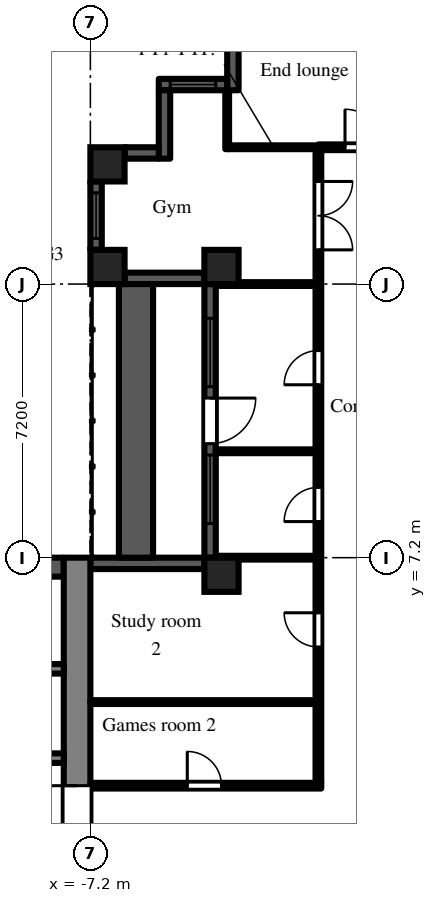
"""IFC4 building model, lengths in metres.
Left out: names, types, materials, properties, quantities, classifications, styles, units other than length and angle.
Written with IfcOpenShell. Run it as: python <this file> out.ifc"""

import sys

from ifc_helpers import new_model, si_unit, direction, frame, frame_2d, origin, origin_2d, place, context, subcontext, project, spatial, rectangle, extrude, element, fill, save


model = new_model("IFC4")
c1 = context("Model", 3, precision=1e-05, world=origin(), true_north=direction((0.0, 1.0)))
c2 = subcontext(c1, "Body", "Model", "MODEL_VIEW")
j1 = project(units=[si_unit("LENGTHUNIT", "METRE"), si_unit("PLANEANGLEUNIT", "RADIAN")], contexts=[c1])
p1 = place(None, origin())
s1 = spatial("IfcSite", under=j1, at=p1, CompositionType="ELEMENT")
p2 = place(p1, origin())
s2 = spatial("IfcBuilding", under=s1, at=p2, CompositionType="ELEMENT")
p3 = place(p2, frame((0.0, 0.0, 102.9)))
s3 = spatial("IfcBuildingStorey", under=s2, at=p3, CompositionType="ELEMENT", Elevation=102.9)
for number, where, z_axis, x_axis in (
    (1, (-6.75, 14.85, 0.0), (0.0, 0.0, 1.0), (1.0, 0.0, 0.0)),
    (2, (-6.75, 17.55, 0.0), (0.0, 0.0, 1.0), (1.0, 0.0, 0.0)),
    (3, (-3.75, 6.75, 0.0), (0.0, 0.0, 1.0), (1.0, 0.0, 0.0)),
    (4, (-3.75, 14.85, 0.0), (0.0, 0.0, 1.0), (1.0, 0.0, 0.0)),
):
    element("IfcColumn", number, at=place(p3, frame(where, z_axis=z_axis, x_axis=x_axis)), inside=s3, PredefinedType="COLUMN", context=c2, shape_type="SweptSolid", body=[
        extrude(rectangle(XDim=0.9, YDim=0.9, at=origin_2d()), origin(), (0.0, 0.0, 1.0), 3.0),
    ])
p4 = place(p3, frame((-3.45, 20.7, 0.0), z_axis=(0.0, 0.0, 1.0), x_axis=(0.0, -1.0, 0.0)))
e5 = element("IfcWall", 5, at=p4, inside=s3, PredefinedType="SOLIDWALL", context=c2, shape_type="SweptSolid", body=[
    extrude(rectangle(XDim=1.2, YDim=0.3, at=frame_2d((0.6, 0.0))), origin(), (0.0, 0.0, 1.0), 2.575),
])
p5 = place(p3, frame((-3.6, 19.65, 0.0), z_axis=(0.0, 0.0, 1.0), x_axis=(-1.0, 0.0, 0.0)))
e6 = element("IfcWall", 6, at=p5, inside=s3, PredefinedType="SOLIDWALL", context=c2, shape_type="SweptSolid", body=[
    extrude(rectangle(XDim=1.8, YDim=0.3, at=frame_2d((0.9, 0.0))), origin(), (0.0, 0.0, 1.0), 2.575),
])
p6 = place(p5, frame((0.3, 0.0, 0.2)))
e7 = element("IfcOpeningElement", 7, at=p6, cuts=e6, PredefinedType="OPENING", context=c2, shape_type="SweptSolid", body=[
    extrude(rectangle(XDim=1.2, YDim=1.85, at=frame_2d((0.6, 0.925))), frame((0.0, 0.16, 0.0), z_axis=(0.0, -1.0, 0.0), x_axis=(1.0, 0.0, 0.0)), (0.0, 0.0, 1.0), 0.32),
])
p7 = place(p3, frame((-5.25, 19.5, 0.0), z_axis=(0.0, 0.0, 1.0), x_axis=(0.0, -1.0, 0.0)))
e8 = element("IfcWall", 8, at=p7, inside=s3, PredefinedType="SOLIDWALL", context=c2, shape_type="SweptSolid", body=[
    extrude(rectangle(XDim=1.8, YDim=0.3, at=frame_2d((0.9, 0.0))), origin(), (0.0, 0.0, 1.0), 2.575),
])
p8 = place(p3, frame((-5.4, 17.85, 0.0), z_axis=(0.0, 0.0, 1.0), x_axis=(-1.0, 0.0, 0.0)))
e9 = element("IfcWall", 9, at=p8, inside=s3, PredefinedType="SOLIDWALL", context=c2, shape_type="SweptSolid", body=[
    extrude(rectangle(XDim=0.9, YDim=0.3, at=frame_2d((0.45, 0.0))), origin(), (0.0, 0.0, 1.0), 2.575),
])
p9 = place(p3, frame((-7.05, 17.1, 0.0), z_axis=(0.0, 0.0, 1.0), x_axis=(0.0, -1.0, 0.0)))
e10 = element("IfcWall", 10, at=p9, inside=s3, PredefinedType="SOLIDWALL", context=c2, shape_type="SweptSolid", body=[
    extrude(rectangle(XDim=1.8, YDim=0.3, at=frame_2d((0.9, 0.0))), origin(), (0.0, 0.0, 1.0), 2.1),
])
p10 = place(p9, frame((0.3, 0.0, 0.2)))
e11 = element("IfcOpeningElement", 11, at=p10, cuts=e10, PredefinedType="OPENING", context=c2, shape_type="SweptSolid", body=[
    extrude(rectangle(XDim=1.2, YDim=1.85, at=frame_2d((0.6, 0.925))), frame((0.0, 0.16, 0.0), z_axis=(0.0, -1.0, 0.0), x_axis=(1.0, 0.0, 0.0)), (0.0, 0.0, 1.0), 0.32),
])
p11 = place(p3, frame((-6.3, 14.55, 0.0), z_axis=(0.0, 0.0, 1.0), x_axis=(1.0, 0.0, 0.0)))
e12 = element("IfcWall", 12, at=p11, inside=s3, PredefinedType="SOLIDWALL", context=c2, shape_type="SweptSolid", body=[
    extrude(rectangle(XDim=2.1, YDim=0.3, at=frame_2d((1.05, 0.0))), origin(), (0.0, 0.0, 1.0), 2.1),
])
p12 = place(p3, frame((-4.05, 14.4, 0.0), z_axis=(0.0, 0.0, 1.0), x_axis=(0.0, -1.0, 0.0)))
e13 = element("IfcWall", 13, at=p12, inside=s3, PredefinedType="SOLIDWALL", context=c2, shape_type="SweptSolid", body=[
    extrude(rectangle(XDim=7.2, YDim=0.3, at=frame_2d((3.6, 0.0))), origin(), (0.0, 0.0, 1.0), 2.1),
])
p13 = place(p12, frame((3.0, 0.0, 0.0)))
e14 = element("IfcOpeningElement", 14, at=p13, cuts=e13, PredefinedType="OPENING", context=c2, shape_type="SweptSolid", body=[
    extrude(rectangle(XDim=1.2, YDim=2.05, at=frame_2d((0.6, 1.025))), frame((0.0, 0.16, 0.0), z_axis=(0.0, -1.0, 0.0), x_axis=(1.0, 0.0, 0.0)), (0.0, 0.0, 1.0), 0.32),
])
p14 = place(p12, frame((0.9, 0.0, 0.2)))
e15 = element("IfcOpeningElement", 15, at=p14, cuts=e13, PredefinedType="OPENING", context=c2, shape_type="SweptSolid", body=[
    extrude(rectangle(XDim=1.8, YDim=1.85, at=frame_2d((0.9, 0.925))), frame((0.0, 0.16, 0.0), z_axis=(0.0, -1.0, 0.0), x_axis=(1.0, 0.0, 0.0)), (0.0, 0.0, 1.0), 0.32),
])
p15 = place(p12, frame((4.5, 0.0, 0.2)))
e16 = element("IfcOpeningElement", 16, at=p15, cuts=e13, PredefinedType="OPENING", context=c2, shape_type="SweptSolid", body=[
    extrude(rectangle(XDim=1.8, YDim=1.85, at=frame_2d((0.9, 0.925))), frame((0.0, 0.16, 0.0), z_axis=(0.0, -1.0, 0.0), x_axis=(1.0, 0.0, 0.0)), (0.0, 0.0, 1.0), 0.32),
])
p16 = place(p3, frame((-4.2, 7.05, 0.0), z_axis=(0.0, 0.0, 1.0), x_axis=(-1.0, 0.0, 0.0)))
e17 = element("IfcWall", 17, at=p16, inside=s3, PredefinedType="SOLIDWALL", context=c2, shape_type="SweptSolid", body=[
    extrude(rectangle(XDim=3.0, YDim=0.3, at=frame_2d((1.5, 0.0))), origin(), (0.0, 0.0, 1.0), 2.1),
])
p17 = place(p3, frame((-6.0, 7.2, 0.0), z_axis=(0.0, 0.0, 1.0), x_axis=(0.0, 1.0, 0.0)))
e18 = element("IfcWall", 18, at=p17, inside=s3, PredefinedType="PARAPET", context=c2, shape_type="SweptSolid", body=[
    extrude(rectangle(XDim=7.2, YDim=0.9, at=frame_2d((3.6, 0.0))), origin(), (0.0, 0.0, 1.0), 0.8),
])
p18 = place(p3, frame((-7.55, -7.2, 0.0), z_axis=(0.0, 0.0, 1.0), x_axis=(0.0, 1.0, 0.0)))
e19 = element("IfcWall", 19, at=p18, inside=s3, PredefinedType="SHEAR", context=c2, shape_type="SweptSolid", body=[
    extrude(rectangle(XDim=14.4, YDim=0.7, at=frame_2d((7.2, 0.0))), origin(), (0.0, 0.0, 1.0), 2.575),
])
p19 = place(p18, frame((6.0, 0.0, 0.0)))
e20 = element("IfcOpeningElement", 20, at=p19, cuts=e19, PredefinedType="OPENING", context=c2, shape_type="SweptSolid", body=[
    extrude(rectangle(XDim=2.4, YDim=2.2, at=frame_2d((1.2, 1.1))), frame((0.0, 0.36, 0.0), z_axis=(0.0, -1.0, 0.0), x_axis=(1.0, 0.0, 0.0)), (0.0, 0.0, 1.0), 0.72),
])
p20 = place(p3, frame((-7.9, 6.95, 0.0), z_axis=(0.0, 0.0, 1.0), x_axis=(-1.0, 0.0, 0.0)))
e21 = element("IfcWall", 21, at=p20, inside=s3, PredefinedType="SHEAR", context=c2, shape_type="SweptSolid", body=[
    extrude(rectangle(XDim=12.95, YDim=0.5, at=frame_2d((6.475, 0.0))), origin(), (0.0, 0.0, 1.0), 2.575),
])
p21 = place(p3, frame((-7.9, 1.925, 0.0), z_axis=(0.0, 0.0, 1.0), x_axis=(-1.0, 0.0, 0.0)))
e22 = element("IfcWall", 22, at=p21, inside=s3, PredefinedType="SHEAR", context=c2, shape_type="SweptSolid", body=[
    extrude(rectangle(XDim=12.95, YDim=0.25, at=frame_2d((6.475, 0.0))), origin(), (0.0, 0.0, 1.0), 2.575),
])
p22 = place(p21, frame((0.525, 0.0, 0.0)))
e23 = element("IfcOpeningElement", 23, at=p22, cuts=e22, PredefinedType="OPENING", context=c2, shape_type="SweptSolid", body=[
    extrude(rectangle(XDim=0.9, YDim=2.1, at=frame_2d((0.45, 1.05))), frame((0.0, 0.135, 0.0), z_axis=(0.0, -1.0, 0.0), x_axis=(1.0, 0.0, 0.0)), (0.0, 0.0, 1.0), 0.27),
])
p23 = place(p21, frame((2.625, 0.0, 0.0)))
e24 = element("IfcOpeningElement", 24, at=p23, cuts=e22, PredefinedType="OPENING", context=c2, shape_type="SweptSolid", body=[
    extrude(rectangle(XDim=1.1, YDim=2.1, at=frame_2d((0.55, 1.05))), frame((0.0, 0.135, 0.0), z_axis=(0.0, -1.0, 0.0), x_axis=(1.0, 0.0, 0.0)), (0.0, 0.0, 1.0), 0.27),
])
p24 = place(p21, frame((4.925, 0.0, 0.0)))
e25 = element("IfcOpeningElement", 25, at=p24, cuts=e22, PredefinedType="OPENING", context=c2, shape_type="SweptSolid", body=[
    extrude(rectangle(XDim=0.9, YDim=2.1, at=frame_2d((0.45, 1.05))), frame((0.0, 0.135, 0.0), z_axis=(0.0, -1.0, 0.0), x_axis=(1.0, 0.0, 0.0)), (0.0, 0.0, 1.0), 0.27),
])
p25 = place(p21, frame((8.225, 0.0, 0.0)))
e26 = element("IfcOpeningElement", 26, at=p25, cuts=e22, PredefinedType="OPENING", context=c2, shape_type="SweptSolid", body=[
    extrude(rectangle(XDim=0.9, YDim=2.1, at=frame_2d((0.45, 1.05))), frame((0.0, 0.135, 0.0), z_axis=(0.0, -1.0, 0.0), x_axis=(1.0, 0.0, 0.0)), (0.0, 0.0, 1.0), 0.27),
])
p26 = place(p3, frame((-7.9, 4.275, 0.0), z_axis=(0.0, 0.0, 1.0), x_axis=(-1.0, 0.0, 0.0)))
e27 = element("IfcWall", 27, at=p26, inside=s3, PredefinedType="SHEAR", context=c2, shape_type="SweptSolid", body=[
    extrude(rectangle(XDim=1.95, YDim=0.25, at=frame_2d((0.975, 0.0))), origin(), (0.0, 0.0, 1.0), 2.575),
])
p27 = place(p3, frame((-7.2, 1.2, 0.0), z_axis=(0.0, 0.0, 1.0), x_axis=(1.0, 0.0, 0.0)))
e28 = element("IfcWall", 28, at=p27, inside=s3, PredefinedType="PARTITIONING", context=c2, shape_type="SweptSolid", body=[
    extrude(rectangle(XDim=6.075, YDim=0.15, at=frame_2d((3.038, 0.0))), origin(), (0.0, 0.0, 1.0), 2.575),
])
p28 = place(p27, frame((2.55, 0.0, 0.0)))
e29 = element("IfcOpeningElement", 29, at=p28, cuts=e28, PredefinedType="OPENING", context=c2, shape_type="SweptSolid", body=[
    extrude(rectangle(XDim=0.9, YDim=2.1, at=frame_2d((0.45, 1.05))), frame((0.0, 0.085, 0.0), z_axis=(0.0, -1.0, 0.0), x_axis=(1.0, 0.0, 0.0)), (0.0, 0.0, 1.0), 0.17),
])
p29 = place(p3, frame((-7.2, 3.4, 0.0), z_axis=(0.0, 0.0, 1.0), x_axis=(1.0, 0.0, 0.0)))
e30 = element("IfcWall", 30, at=p29, inside=s3, PredefinedType="PARTITIONING", context=c2, shape_type="SweptSolid", body=[
    extrude(rectangle(XDim=5.925, YDim=0.1, at=frame_2d((2.962, 0.0))), origin(), (0.0, 0.0, 1.0), 2.575),
])
for number, where, z_axis, x_axis in (
    (31, (-3.9, 7.2, 0.0), (0.0, 0.0, 1.0), (1.0, 0.0, 0.0)),
    (32, (-3.9, 10.0, 0.0), (0.0, 0.0, 1.0), (1.0, 0.0, 0.0)),
    (33, (-3.9, 14.4, 0.0), (0.0, 0.0, 1.0), (1.0, 0.0, 0.0)),
):
    element("IfcWall", number, at=place(p3, frame(where, z_axis=z_axis, x_axis=x_axis)), inside=s3, PredefinedType="PARTITIONING", context=c2, shape_type="SweptSolid", body=[
        extrude(rectangle(XDim=2.625, YDim=0.1, at=frame_2d((1.312, 0.0))), origin(), (0.0, 0.0, 1.0), 2.575),
    ])
p30 = place(p3, frame((-3.6, 17.95, 0.0), z_axis=(0.0, 0.0, 1.0), x_axis=(0.0, 1.0, 0.0)))
e34 = element("IfcWall", 34, at=p30, inside=s3, PredefinedType="PARTITIONING", context=c2, shape_type="SweptSolid", body=[
    extrude(rectangle(XDim=1.55, YDim=0.1, at=frame_2d((0.775, 0.0))), origin(), (0.0, 0.0, 1.0), 2.575),
])
p31 = place(p3, frame((-3.55, 18.0, 0.0), z_axis=(0.0, 0.0, 1.0), x_axis=(1.0, 0.0, 0.0)))
e35 = element("IfcWall", 35, at=p31, inside=s3, PredefinedType="PARTITIONING", context=c2, shape_type="SweptSolid", body=[
    extrude(rectangle(XDim=2.35, YDim=0.1, at=frame_2d((1.175, 0.0))), origin(), (0.0, 0.0, 1.0), 2.575),
])
p32 = place(p3, frame((-1.2, 1.275, 0.0), z_axis=(0.0, 0.0, 1.0), x_axis=(0.0, 1.0, 0.0)))
e36 = element("IfcWall", 36, at=p32, inside=s3, PredefinedType="PARTITIONING", context=c2, shape_type="SweptSolid", body=[
    extrude(rectangle(XDim=16.65, YDim=0.15, at=frame_2d((8.325, 0.0))), origin(), (0.0, 0.0, 1.0), 2.575),
])
p33 = place(p32, frame((3.575, 0.0, 0.0)))
e37 = element("IfcOpeningElement", 37, at=p33, cuts=e36, PredefinedType="OPENING", context=c2, shape_type="SweptSolid", body=[
    extrude(rectangle(XDim=0.9, YDim=2.1, at=frame_2d((0.45, 1.05))), frame((0.0, 0.085, 0.0), z_axis=(0.0, -1.0, 0.0), x_axis=(1.0, 0.0, 0.0)), (0.0, 0.0, 1.0), 0.17),
])
p34 = place(p32, frame((6.875, 0.0, 0.0)))
e38 = element("IfcOpeningElement", 38, at=p34, cuts=e36, PredefinedType="OPENING", context=c2, shape_type="SweptSolid", body=[
    extrude(rectangle(XDim=0.9, YDim=2.1, at=frame_2d((0.45, 1.05))), frame((0.0, 0.085, 0.0), z_axis=(0.0, -1.0, 0.0), x_axis=(1.0, 0.0, 0.0)), (0.0, 0.0, 1.0), 0.17),
])
p35 = place(p32, frame((10.475, 0.0, 0.0)))
e39 = element("IfcOpeningElement", 39, at=p35, cuts=e36, PredefinedType="OPENING", context=c2, shape_type="SweptSolid", body=[
    extrude(rectangle(XDim=0.9, YDim=2.1, at=frame_2d((0.45, 1.05))), frame((0.0, 0.085, 0.0), z_axis=(0.0, -1.0, 0.0), x_axis=(1.0, 0.0, 0.0)), (0.0, 0.0, 1.0), 0.17),
])
p36 = place(p32, frame((14.025, 0.0, 0.0)))
e40 = element("IfcOpeningElement", 40, at=p36, cuts=e36, PredefinedType="OPENING", context=c2, shape_type="SweptSolid", body=[
    extrude(rectangle(XDim=1.8, YDim=2.1, at=frame_2d((0.9, 1.05))), frame((0.0, 0.085, 0.0), z_axis=(0.0, -1.0, 0.0), x_axis=(1.0, 0.0, 0.0)), (0.0, 0.0, 1.0), 0.17),
])
p37 = place(p3, frame((-1.2, 18.0, 0.0), z_axis=(0.0, 0.0, 1.0), x_axis=(1.0, 0.0, 0.0)))
e41 = element("IfcWall", 41, at=p37, inside=s3, PredefinedType="PARTITIONING", context=c2, shape_type="SweptSolid", body=[
    extrude(rectangle(XDim=2.4, YDim=0.15, at=frame_2d((1.2, 0.0))), origin(), (0.0, 0.0, 1.0), 2.575),
])
p38 = place(p37, frame((0.7, 0.0, 0.0)))
e42 = element("IfcOpeningElement", 42, at=p38, cuts=e41, PredefinedType="OPENING", context=c2, shape_type="SweptSolid", body=[
    extrude(rectangle(XDim=1.0, YDim=2.1, at=frame_2d((0.5, 1.05))), frame((0.0, 0.085, 0.0), z_axis=(0.0, -1.0, 0.0), x_axis=(1.0, 0.0, 0.0)), (0.0, 0.0, 1.0), 0.17),
])
p39 = place(p6, origin())
e43 = element("IfcWindow", 43, at=p39, inside=s3, PartitioningType="SINGLE_PANEL", PredefinedType="WINDOW", context=c2, shape_type="SweptSolid", body=[
    extrude(rectangle(XDim=1.2, YDim=1.85, at=frame_2d((0.6, 0.925))), frame((0.0, 0.03, 0.0), z_axis=(0.0, -1.0, 0.0), x_axis=(1.0, 0.0, 0.0)), (0.0, 0.0, 1.0), 0.06),
])
fill(e7, e43)
p40 = place(p10, origin())
e44 = element("IfcWindow", 44, at=p40, inside=s3, PartitioningType="SINGLE_PANEL", PredefinedType="WINDOW", context=c2, shape_type="SweptSolid", body=[
    extrude(rectangle(XDim=1.2, YDim=1.85, at=frame_2d((0.6, 0.925))), frame((0.0, 0.03, 0.0), z_axis=(0.0, -1.0, 0.0), x_axis=(1.0, 0.0, 0.0)), (0.0, 0.0, 1.0), 0.06),
])
fill(e11, e44)
p41 = place(p13, origin())
e45 = element("IfcDoor", 45, at=p41, inside=s3, OperationType="SINGLE_SWING_LEFT", PredefinedType="DOOR", context=c2, shape_type="SweptSolid", body=[
    extrude(rectangle(XDim=1.2, YDim=2.05, at=frame_2d((0.6, 1.025))), frame((0.0, 0.025, 0.0), z_axis=(0.0, -1.0, 0.0), x_axis=(1.0, 0.0, 0.0)), (0.0, 0.0, 1.0), 0.05),
])
fill(e14, e45)
p42 = place(p14, origin())
e46 = element("IfcWindow", 46, at=p42, inside=s3, PartitioningType="SINGLE_PANEL", PredefinedType="WINDOW", context=c2, shape_type="SweptSolid", body=[
    extrude(rectangle(XDim=1.8, YDim=1.85, at=frame_2d((0.9, 0.925))), frame((0.0, 0.03, 0.0), z_axis=(0.0, -1.0, 0.0), x_axis=(1.0, 0.0, 0.0)), (0.0, 0.0, 1.0), 0.06),
])
fill(e15, e46)
p43 = place(p15, origin())
e47 = element("IfcWindow", 47, at=p43, inside=s3, PartitioningType="SINGLE_PANEL", PredefinedType="WINDOW", context=c2, shape_type="SweptSolid", body=[
    extrude(rectangle(XDim=1.8, YDim=1.85, at=frame_2d((0.9, 0.925))), frame((0.0, 0.03, 0.0), z_axis=(0.0, -1.0, 0.0), x_axis=(1.0, 0.0, 0.0)), (0.0, 0.0, 1.0), 0.06),
])
fill(e16, e47)
p44 = place(p19, origin())
e48 = element("IfcDoor", 48, at=p44, inside=s3, OperationType="DOUBLE_DOOR_DOUBLE_SWING", PredefinedType="DOOR", context=c2, shape_type="SweptSolid", body=[
    extrude(rectangle(XDim=2.4, YDim=2.2, at=frame_2d((1.2, 1.1))), frame((0.0, 0.025, 0.0), z_axis=(0.0, -1.0, 0.0), x_axis=(1.0, 0.0, 0.0)), (0.0, 0.0, 1.0), 0.05),
])
fill(e20, e48)
p45 = place(p28, origin())
e49 = element("IfcDoor", 49, at=p45, inside=s3, OperationType="SINGLE_SWING_LEFT", PredefinedType="DOOR", context=c2, shape_type="SweptSolid", body=[
    extrude(rectangle(XDim=0.9, YDim=2.1, at=frame_2d((0.45, 1.05))), frame((0.0, 0.025, 0.0), z_axis=(0.0, -1.0, 0.0), x_axis=(1.0, 0.0, 0.0)), (0.0, 0.0, 1.0), 0.05),
])
fill(e29, e49)
p46 = place(p33, origin())
e50 = element("IfcDoor", 50, at=p46, inside=s3, OperationType="SINGLE_SWING_RIGHT", PredefinedType="DOOR", context=c2, shape_type="SweptSolid", body=[
    extrude(rectangle(XDim=0.9, YDim=2.1, at=frame_2d((0.45, 1.05))), frame((0.0, 0.025, 0.0), z_axis=(0.0, -1.0, 0.0), x_axis=(1.0, 0.0, 0.0)), (0.0, 0.0, 1.0), 0.05),
])
fill(e37, e50)
p47 = place(p38, origin())
e51 = element("IfcDoor", 51, at=p47, inside=s3, OperationType="SINGLE_SWING_LEFT", PredefinedType="DOOR", context=c2, shape_type="SweptSolid", body=[
    extrude(rectangle(XDim=1.0, YDim=2.1, at=frame_2d((0.5, 1.05))), frame((0.0, 0.025, 0.0), z_axis=(0.0, -1.0, 0.0), x_axis=(1.0, 0.0, 0.0)), (0.0, 0.0, 1.0), 0.05),
])
fill(e42, e51)
p48 = place(p34, origin())
e52 = element("IfcDoor", 52, at=p48, inside=s3, OperationType="SINGLE_SWING_LEFT", PredefinedType="DOOR", context=c2, shape_type="SweptSolid", body=[
    extrude(rectangle(XDim=0.9, YDim=2.1, at=frame_2d((0.45, 1.05))), frame((0.0, 0.025, 0.0), z_axis=(0.0, -1.0, 0.0), x_axis=(1.0, 0.0, 0.0)), (0.0, 0.0, 1.0), 0.05),
])
fill(e38, e52)
p49 = place(p35, origin())
e53 = element("IfcDoor", 53, at=p49, inside=s3, OperationType="SINGLE_SWING_LEFT", PredefinedType="DOOR", context=c2, shape_type="SweptSolid", body=[
    extrude(rectangle(XDim=0.9, YDim=2.1, at=frame_2d((0.45, 1.05))), frame((0.0, 0.025, 0.0), z_axis=(0.0, -1.0, 0.0), x_axis=(1.0, 0.0, 0.0)), (0.0, 0.0, 1.0), 0.05),
])
fill(e39, e53)
p50 = place(p36, frame((1.8, 0.0, 0.0), z_axis=(0.0, 0.0, 1.0), x_axis=(-1.0, 0.0, 0.0)))
e54 = element("IfcDoor", 54, at=p50, inside=s3, OperationType="DOUBLE_DOOR_DOUBLE_SWING", PredefinedType="DOOR", context=c2, shape_type="SweptSolid", body=[
    extrude(rectangle(XDim=1.8, YDim=2.1, at=frame_2d((0.9, 1.05))), frame((0.0, 0.025, 0.0), z_axis=(0.0, -1.0, 0.0), x_axis=(1.0, 0.0, 0.0)), (0.0, 0.0, 1.0), 0.05),
])
fill(e40, e54)
save(model, sys.argv[1])
